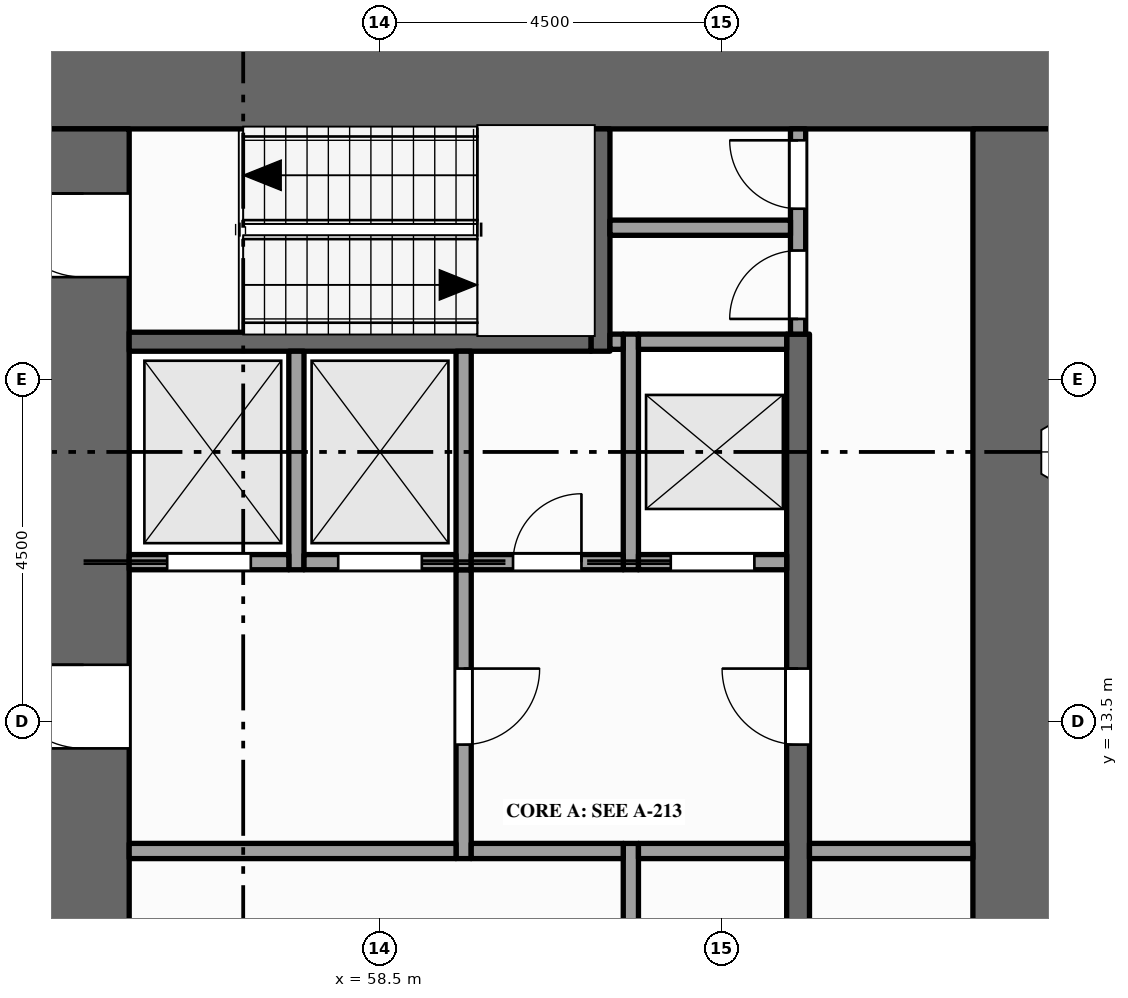
"""IFC4 building model, lengths in metres.
Left out: names, types, materials, properties, quantities, classifications, styles, units other than length and angle.
Written with IfcOpenShell. Run it as: python <this file> out.ifc"""

import sys

from ifc_helpers import new_model, si_unit, direction, frame, frame_2d, origin, place, context, subcontext, project, spatial, rectangle, extrude, element, fill, save


model = new_model("IFC4")
c1 = context("Model", 3, precision=1e-05, world=origin(), true_north=direction((0.0, 1.0)))
c2 = subcontext(c1, "Body", "Model", "MODEL_VIEW")
j1 = project(units=[si_unit("LENGTHUNIT", "METRE"), si_unit("PLANEANGLEUNIT", "RADIAN")], contexts=[c1])
p1 = place(None, origin())
s1 = spatial("IfcSite", under=j1, at=p1, CompositionType="ELEMENT")
p2 = place(p1, origin())
s2 = spatial("IfcBuilding", under=s1, at=p2, CompositionType="ELEMENT")
p3 = place(p2, frame((0.0, 0.0, 69.0)))
s3 = spatial("IfcBuildingStorey", under=s2, at=p3, CompositionType="ELEMENT", Elevation=69.0)
p4 = place(p3, frame((54.0, 21.9, -0.15), z_axis=(0.0, 0.0, 1.0), x_axis=(1.0, 0.0, 0.0)))
e1 = element("IfcWall", 1, at=p4, inside=s3, PredefinedType="SHEAR", context=c2, shape_type="SweptSolid", body=[
    extrude(rectangle(XDim=13.5, YDim=1.2, at=frame_2d((6.75, 0.0))), origin(), (0.0, 0.0, 1.0), 4.0),
])
p5 = place(p3, frame((54.6, 1.2, -0.15), z_axis=(0.0, 0.0, 1.0), x_axis=(0.0, 1.0, 0.0)))
e2 = element("IfcWall", 2, at=p5, inside=s3, PredefinedType="SHEAR", context=c2, shape_type="SweptSolid", body=[
    extrude(rectangle(XDim=20.1, YDim=1.2, at=frame_2d((10.05, 0.0))), origin(), (0.0, 0.0, 1.0), 4.0),
])
p6 = place(p5, frame((5.9, 0.0, 0.15)))
e3 = element("IfcOpeningElement", 3, at=p6, cuts=e2, PredefinedType="OPENING", context=c2, shape_type="SweptSolid", body=[
    extrude(rectangle(XDim=1.8, YDim=2.1, at=frame_2d((0.9, 1.05))), frame((0.0, 0.61, 0.0), z_axis=(0.0, -1.0, 0.0), x_axis=(1.0, 0.0, 0.0)), (0.0, 0.0, 1.0), 1.22),
])
p7 = place(p5, frame((11.95, 0.0, 0.15)))
e4 = element("IfcOpeningElement", 4, at=p7, cuts=e2, PredefinedType="OPENING", context=c2, shape_type="SweptSolid", body=[
    extrude(rectangle(XDim=1.1, YDim=2.1, at=frame_2d((0.55, 1.05))), frame((0.0, 0.61, 0.0), z_axis=(0.0, -1.0, 0.0), x_axis=(1.0, 0.0, 0.0)), (0.0, 0.0, 1.0), 1.22),
])
p8 = place(p5, frame((0.95, 0.0, 0.15)))
e5 = element("IfcOpeningElement", 5, at=p8, cuts=e2, PredefinedType="OPENING", context=c2, shape_type="SweptSolid", body=[
    extrude(rectangle(XDim=1.1, YDim=2.1, at=frame_2d((0.55, 1.05))), frame((0.0, 0.61, 0.0), z_axis=(0.0, -1.0, 0.0), x_axis=(1.0, 0.0, 0.0)), (0.0, 0.0, 1.0), 1.22),
])
p9 = place(p5, frame((18.15, 0.0, 0.15)))
e6 = element("IfcOpeningElement", 6, at=p9, cuts=e2, PredefinedType="OPENING", context=c2, shape_type="SweptSolid", body=[
    extrude(rectangle(XDim=1.1, YDim=2.1, at=frame_2d((0.55, 1.05))), frame((0.0, 0.61, 0.0), z_axis=(0.0, -1.0, 0.0), x_axis=(1.0, 0.0, 0.0)), (0.0, 0.0, 1.0), 1.22),
])
p10 = place(p3, frame((66.9, 1.2, -0.15), z_axis=(0.0, 0.0, 1.0), x_axis=(0.0, 1.0, 0.0)))
e7 = element("IfcWall", 7, at=p10, inside=s3, PredefinedType="SHEAR", context=c2, shape_type="SweptSolid", body=[
    extrude(rectangle(XDim=20.1, YDim=1.2, at=frame_2d((10.05, 0.0))), origin(), (0.0, 0.0, 1.0), 4.0),
])
p11 = place(p3, frame((57.4, 15.5, 0.0), z_axis=(0.0, 0.0, 1.0), x_axis=(0.0, 1.0, 0.0)))
e8 = element("IfcWall", 8, at=p11, inside=s3, PredefinedType="SOLIDWALL", context=c2, shape_type="SweptSolid", body=[
    extrude(rectangle(XDim=2.875, YDim=0.2, at=frame_2d((1.438, 0.0))), origin(), (0.0, 0.0, 1.0), 3.85),
])
p12 = place(p3, frame((59.6, 11.7, 0.0), z_axis=(0.0, 0.0, 1.0), x_axis=(0.0, 1.0, 0.0)))
e9 = element("IfcWall", 9, at=p12, inside=s3, PredefinedType="PARTITIONING", context=c2, shape_type="SweptSolid", body=[
    extrude(rectangle(XDim=3.8, YDim=0.2, at=frame_2d((1.9, 0.0))), origin(), (0.0, 0.0, 1.0), 3.85),
])
p13 = place(p12, frame((1.5, 0.0, 0.0)))
e10 = element("IfcOpeningElement", 10, at=p13, cuts=e9, PredefinedType="OPENING", context=c2, shape_type="SweptSolid", body=[
    extrude(rectangle(XDim=1.0, YDim=2.1, at=frame_2d((0.5, 1.05))), frame((0.0, 0.11, 0.0), z_axis=(0.0, -1.0, 0.0), x_axis=(1.0, 0.0, 0.0)), (0.0, 0.0, 1.0), 0.22),
])
p14 = place(p3, frame((59.6, 15.5, 0.0), z_axis=(0.0, 0.0, 1.0), x_axis=(0.0, 1.0, 0.0)))
e11 = element("IfcWall", 11, at=p14, inside=s3, PredefinedType="SOLIDWALL", context=c2, shape_type="SweptSolid", body=[
    extrude(rectangle(XDim=2.875, YDim=0.2, at=frame_2d((1.438, 0.0))), origin(), (0.0, 0.0, 1.0), 3.85),
])
p15 = place(p3, frame((61.4, 18.375, 0.0), z_axis=(0.0, 0.0, 1.0), x_axis=(0.0, 1.0, 0.0)))
e12 = element("IfcWall", 12, at=p15, inside=s3, PredefinedType="SHEAR", context=c2, shape_type="SweptSolid", body=[
    extrude(rectangle(XDim=2.925, YDim=0.25, at=frame_2d((1.462, 0.0))), origin(), (0.0, 0.0, 1.0), 3.85),
])
p16 = place(p3, frame((61.8, 9.3, 0.0), z_axis=(0.0, 0.0, 1.0), x_axis=(0.0, 1.0, 0.0)))
e13 = element("IfcWall", 13, at=p16, inside=s3, PredefinedType="PARTITIONING", context=c2, shape_type="SweptSolid", body=[
    extrude(rectangle(XDim=2.6, YDim=0.2, at=frame_2d((1.3, 0.0))), origin(), (0.0, 0.0, 1.0), 3.85),
])
p17 = place(p3, frame((61.8, 15.5, 0.0), z_axis=(0.0, 0.0, 1.0), x_axis=(0.0, 1.0, 0.0)))
e14 = element("IfcWall", 14, at=p17, inside=s3, PredefinedType="SOLIDWALL", context=c2, shape_type="SweptSolid", body=[
    extrude(rectangle(XDim=3.1, YDim=0.2, at=frame_2d((1.55, 0.0))), origin(), (0.0, 0.0, 1.0), 3.85),
])
p18 = place(p3, frame((64.0, 4.1, 0.0), z_axis=(0.0, 0.0, 1.0), x_axis=(0.0, 1.0, 0.0)))
e15 = element("IfcWall", 15, at=p18, inside=s3, PredefinedType="SHEAR", context=c2, shape_type="SweptSolid", body=[
    extrude(rectangle(XDim=14.5, YDim=0.3, at=frame_2d((7.25, 0.0))), origin(), (0.0, 0.0, 1.0), 3.85),
])
p19 = place(p18, frame((3.4, 0.0, 0.0)))
e16 = element("IfcOpeningElement", 16, at=p19, cuts=e15, PredefinedType="OPENING", context=c2, shape_type="SweptSolid", body=[
    extrude(rectangle(XDim=1.0, YDim=2.1, at=frame_2d((0.5, 1.05))), frame((0.0, 0.16, 0.0), z_axis=(0.0, -1.0, 0.0), x_axis=(1.0, 0.0, 0.0)), (0.0, 0.0, 1.0), 0.32),
])
p20 = place(p18, frame((9.1, 0.0, 0.0)))
e17 = element("IfcOpeningElement", 17, at=p20, cuts=e15, PredefinedType="OPENING", context=c2, shape_type="SweptSolid", body=[
    extrude(rectangle(XDim=1.0, YDim=2.1, at=frame_2d((0.5, 1.05))), frame((0.0, 0.16, 0.0), z_axis=(0.0, -1.0, 0.0), x_axis=(1.0, 0.0, 0.0)), (0.0, 0.0, 1.0), 0.32),
])
p21 = place(p3, frame((64.0, 18.6, 0.0), z_axis=(0.0, 0.0, 1.0), x_axis=(0.0, 1.0, 0.0)))
e18 = element("IfcWall", 18, at=p21, inside=s3, PredefinedType="PARTITIONING", context=c2, shape_type="SweptSolid", body=[
    extrude(rectangle(XDim=2.7, YDim=0.2, at=frame_2d((1.35, 0.0))), origin(), (0.0, 0.0, 1.0), 3.85),
])
p22 = place(p21, frame((0.2, 0.0, 0.0)))
e19 = element("IfcOpeningElement", 19, at=p22, cuts=e18, PredefinedType="OPENING", context=c2, shape_type="SweptSolid", body=[
    extrude(rectangle(XDim=0.9, YDim=2.1, at=frame_2d((0.45, 1.05))), frame((0.0, 0.11, 0.0), z_axis=(0.0, -1.0, 0.0), x_axis=(1.0, 0.0, 0.0)), (0.0, 0.0, 1.0), 0.22),
])
p23 = place(p21, frame((1.65, 0.0, 0.0)))
e20 = element("IfcOpeningElement", 20, at=p23, cuts=e18, PredefinedType="OPENING", context=c2, shape_type="SweptSolid", body=[
    extrude(rectangle(XDim=0.9, YDim=2.1, at=frame_2d((0.45, 1.05))), frame((0.0, 0.11, 0.0), z_axis=(0.0, -1.0, 0.0), x_axis=(1.0, 0.0, 0.0)), (0.0, 0.0, 1.0), 0.22),
])
p24 = place(p3, frame((55.2, 11.8, 0.0), z_axis=(0.0, 0.0, 1.0), x_axis=(1.0, 0.0, 0.0)))
e21 = element("IfcWall", 21, at=p24, inside=s3, PredefinedType="PARTITIONING", context=c2, shape_type="SweptSolid", body=[
    extrude(rectangle(XDim=4.3, YDim=0.2, at=frame_2d((2.15, 0.0))), origin(), (0.0, 0.0, 1.0), 3.85),
])
p25 = place(p3, frame((59.7, 11.8, 0.0), z_axis=(0.0, 0.0, 1.0), x_axis=(1.0, 0.0, 0.0)))
e22 = element("IfcWall", 22, at=p25, inside=s3, PredefinedType="PARTITIONING", context=c2, shape_type="SweptSolid", body=[
    extrude(rectangle(XDim=2.0, YDim=0.2, at=frame_2d((1.0, 0.0))), origin(), (0.0, 0.0, 1.0), 3.85),
])
p26 = place(p3, frame((61.9, 11.8, 0.0), z_axis=(0.0, 0.0, 1.0), x_axis=(1.0, 0.0, 0.0)))
e23 = element("IfcWall", 23, at=p26, inside=s3, PredefinedType="PARTITIONING", context=c2, shape_type="SweptSolid", body=[
    extrude(rectangle(XDim=1.95, YDim=0.2, at=frame_2d((0.975, 0.0))), origin(), (0.0, 0.0, 1.0), 3.85),
])
p27 = place(p3, frame((64.15, 11.8, 0.0), z_axis=(0.0, 0.0, 1.0), x_axis=(1.0, 0.0, 0.0)))
e24 = element("IfcWall", 24, at=p27, inside=s3, PredefinedType="PARTITIONING", context=c2, shape_type="SweptSolid", body=[
    extrude(rectangle(XDim=2.15, YDim=0.2, at=frame_2d((1.075, 0.0))), origin(), (0.0, 0.0, 1.0), 3.85),
])
p28 = place(p3, frame((55.2, 15.6, 0.0), z_axis=(0.0, 0.0, 1.0), x_axis=(1.0, 0.0, 0.0)))
e25 = element("IfcWall", 25, at=p28, inside=s3, PredefinedType="SOLIDWALL", context=c2, shape_type="SweptSolid", body=[
    extrude(rectangle(XDim=2.1, YDim=0.2, at=frame_2d((1.05, 0.0))), origin(), (0.0, 0.0, 1.0), 3.85),
])
p29 = place(p28, frame((0.5, 0.0, 0.012)))
e26 = element("IfcOpeningElement", 26, at=p29, cuts=e25, PredefinedType="OPENING", context=c2, shape_type="SweptSolid", body=[
    extrude(rectangle(XDim=1.1, YDim=2.1, at=frame_2d((0.55, 1.05))), frame((0.0, 0.11, 0.0), z_axis=(0.0, -1.0, 0.0), x_axis=(1.0, 0.0, 0.0)), (0.0, 0.0, 1.0), 0.22),
])
p30 = place(p3, frame((57.5, 15.6, 0.0), z_axis=(0.0, 0.0, 1.0), x_axis=(1.0, 0.0, 0.0)))
e27 = element("IfcWall", 27, at=p30, inside=s3, PredefinedType="SOLIDWALL", context=c2, shape_type="SweptSolid", body=[
    extrude(rectangle(XDim=2.0, YDim=0.2, at=frame_2d((1.0, 0.0))), origin(), (0.0, 0.0, 1.0), 3.85),
])
p31 = place(p30, frame((0.45, 0.0, 0.012)))
e28 = element("IfcOpeningElement", 28, at=p31, cuts=e27, PredefinedType="OPENING", context=c2, shape_type="SweptSolid", body=[
    extrude(rectangle(XDim=1.1, YDim=2.1, at=frame_2d((0.55, 1.05))), frame((0.0, 0.11, 0.0), z_axis=(0.0, -1.0, 0.0), x_axis=(1.0, 0.0, 0.0)), (0.0, 0.0, 1.0), 0.22),
])
p32 = place(p3, frame((59.7, 15.6, 0.0), z_axis=(0.0, 0.0, 1.0), x_axis=(1.0, 0.0, 0.0)))
e29 = element("IfcWall", 29, at=p32, inside=s3, PredefinedType="PARTITIONING", context=c2, shape_type="SweptSolid", body=[
    extrude(rectangle(XDim=2.0, YDim=0.2, at=frame_2d((1.0, 0.0))), origin(), (0.0, 0.0, 1.0), 3.85),
])
p33 = place(p32, frame((0.55, 0.0, 0.0)))
e30 = element("IfcOpeningElement", 30, at=p33, cuts=e29, PredefinedType="OPENING", context=c2, shape_type="SweptSolid", body=[
    extrude(rectangle(XDim=0.9, YDim=2.1, at=frame_2d((0.45, 1.05))), frame((0.0, 0.11, 0.0), z_axis=(0.0, -1.0, 0.0), x_axis=(1.0, 0.0, 0.0)), (0.0, 0.0, 1.0), 0.22),
])
p34 = place(p3, frame((61.9, 15.6, 0.0), z_axis=(0.0, 0.0, 1.0), x_axis=(1.0, 0.0, 0.0)))
e31 = element("IfcWall", 31, at=p34, inside=s3, PredefinedType="SOLIDWALL", context=c2, shape_type="SweptSolid", body=[
    extrude(rectangle(XDim=1.95, YDim=0.2, at=frame_2d((0.975, 0.0))), origin(), (0.0, 0.0, 1.0), 3.85),
])
p35 = place(p34, frame((0.425, 0.0, 0.012)))
e32 = element("IfcOpeningElement", 32, at=p35, cuts=e31, PredefinedType="OPENING", context=c2, shape_type="SweptSolid", body=[
    extrude(rectangle(XDim=1.1, YDim=2.1, at=frame_2d((0.55, 1.05))), frame((0.0, 0.11, 0.0), z_axis=(0.0, -1.0, 0.0), x_axis=(1.0, 0.0, 0.0)), (0.0, 0.0, 1.0), 0.22),
])
p36 = place(p3, frame((55.2, 18.5, 0.0), z_axis=(0.0, 0.0, 1.0), x_axis=(1.0, 0.0, 0.0)))
e33 = element("IfcWall", 33, at=p36, inside=s3, PredefinedType="SHEAR", context=c2, shape_type="SweptSolid", body=[
    extrude(rectangle(XDim=6.075, YDim=0.25, at=frame_2d((3.038, 0.0))), origin(), (0.0, 0.0, 1.0), 3.85),
])
p37 = place(p3, frame((61.525, 18.5, 0.0), z_axis=(0.0, 0.0, 1.0), x_axis=(1.0, 0.0, 0.0)))
e34 = element("IfcWall", 34, at=p37, inside=s3, PredefinedType="PARTITIONING", context=c2, shape_type="SweptSolid", body=[
    extrude(rectangle(XDim=0.175, YDim=0.2, at=frame_2d((0.087, 0.0))), origin(), (0.0, 0.0, 1.0), 3.85),
])
p38 = place(p3, frame((61.9, 18.5, 0.0), z_axis=(0.0, 0.0, 1.0), x_axis=(1.0, 0.0, 0.0)))
e35 = element("IfcWall", 35, at=p38, inside=s3, PredefinedType="SOLIDWALL", context=c2, shape_type="SweptSolid", body=[
    extrude(rectangle(XDim=1.95, YDim=0.2, at=frame_2d((0.975, 0.0))), origin(), (0.0, 0.0, 1.0), 3.85),
])
p39 = place(p3, frame((61.525, 20.0, 0.0), z_axis=(0.0, 0.0, 1.0), x_axis=(1.0, 0.0, 0.0)))
e36 = element("IfcWall", 36, at=p39, inside=s3, PredefinedType="PARTITIONING", context=c2, shape_type="SweptSolid", body=[
    extrude(rectangle(XDim=2.375, YDim=0.2, at=frame_2d((1.188, 0.0))), origin(), (0.0, 0.0, 1.0), 3.85),
])
p40 = place(p29, origin())
e37 = element("IfcDoor", 37, at=p40, inside=s3, OperationType="SLIDING_TO_LEFT", PredefinedType="DOOR", context=c2, shape_type="SweptSolid", body=[
    extrude(rectangle(XDim=1.1, YDim=2.1, at=frame_2d((0.55, 1.05))), frame((0.0, 0.025, 0.0), z_axis=(0.0, -1.0, 0.0), x_axis=(1.0, 0.0, 0.0)), (0.0, 0.0, 1.0), 0.05),
])
fill(e26, e37)
p41 = place(p31, origin())
e38 = element("IfcDoor", 38, at=p41, inside=s3, OperationType="SLIDING_TO_RIGHT", PredefinedType="DOOR", context=c2, shape_type="SweptSolid", body=[
    extrude(rectangle(XDim=1.1, YDim=2.1, at=frame_2d((0.55, 1.05))), frame((0.0, 0.025, 0.0), z_axis=(0.0, -1.0, 0.0), x_axis=(1.0, 0.0, 0.0)), (0.0, 0.0, 1.0), 0.05),
])
fill(e28, e38)
p42 = place(p35, origin())
e39 = element("IfcDoor", 39, at=p42, inside=s3, OperationType="SLIDING_TO_LEFT", PredefinedType="DOOR", context=c2, shape_type="SweptSolid", body=[
    extrude(rectangle(XDim=1.1, YDim=2.1, at=frame_2d((0.55, 1.05))), frame((0.0, 0.025, 0.0), z_axis=(0.0, -1.0, 0.0), x_axis=(1.0, 0.0, 0.0)), (0.0, 0.0, 1.0), 0.05),
])
fill(e32, e39)
p43 = place(p7, origin())
e40 = element("IfcDoor", 40, at=p43, inside=s3, OperationType="SINGLE_SWING_RIGHT", PredefinedType="DOOR", context=c2, shape_type="SweptSolid", body=[
    extrude(rectangle(XDim=1.1, YDim=2.1, at=frame_2d((0.55, 1.05))), frame((0.0, 0.025, 0.0), z_axis=(0.0, -1.0, 0.0), x_axis=(1.0, 0.0, 0.0)), (0.0, 0.0, 1.0), 0.05),
])
fill(e4, e40)
p44 = place(p13, origin())
e41 = element("IfcDoor", 41, at=p44, inside=s3, OperationType="SINGLE_SWING_RIGHT", PredefinedType="DOOR", context=c2, shape_type="SweptSolid", body=[
    extrude(rectangle(XDim=1.0, YDim=2.1, at=frame_2d((0.5, 1.05))), frame((0.0, 0.025, 0.0), z_axis=(0.0, -1.0, 0.0), x_axis=(1.0, 0.0, 0.0)), (0.0, 0.0, 1.0), 0.05),
])
fill(e10, e41)
p45 = place(p20, origin())
e42 = element("IfcDoor", 42, at=p45, inside=s3, OperationType="SINGLE_SWING_RIGHT", PredefinedType="DOOR", context=c2, shape_type="SweptSolid", body=[
    extrude(rectangle(XDim=1.0, YDim=2.1, at=frame_2d((0.5, 1.05))), frame((0.0, 0.025, 0.0), z_axis=(0.0, -1.0, 0.0), x_axis=(1.0, 0.0, 0.0)), (0.0, 0.0, 1.0), 0.05),
])
fill(e17, e42)
p46 = place(p9, origin())
e43 = element("IfcDoor", 43, at=p46, inside=s3, OperationType="SINGLE_SWING_RIGHT", PredefinedType="DOOR", context=c2, shape_type="SweptSolid", body=[
    extrude(rectangle(XDim=1.1, YDim=2.1, at=frame_2d((0.55, 1.05))), frame((0.0, 0.025, 0.0), z_axis=(0.0, -1.0, 0.0), x_axis=(1.0, 0.0, 0.0)), (0.0, 0.0, 1.0), 0.05),
])
fill(e6, e43)
p47 = place(p22, origin())
e44 = element("IfcDoor", 44, at=p47, inside=s3, OperationType="SINGLE_SWING_LEFT", PredefinedType="DOOR", context=c2, shape_type="SweptSolid", body=[
    extrude(rectangle(XDim=0.9, YDim=2.1, at=frame_2d((0.45, 1.05))), frame((0.0, 0.025, 0.0), z_axis=(0.0, -1.0, 0.0), x_axis=(1.0, 0.0, 0.0)), (0.0, 0.0, 1.0), 0.05),
])
fill(e19, e44)
p48 = place(p23, origin())
e45 = element("IfcDoor", 45, at=p48, inside=s3, OperationType="SINGLE_SWING_RIGHT", PredefinedType="DOOR", context=c2, shape_type="SweptSolid", body=[
    extrude(rectangle(XDim=0.9, YDim=2.1, at=frame_2d((0.45, 1.05))), frame((0.0, 0.025, 0.0), z_axis=(0.0, -1.0, 0.0), x_axis=(1.0, 0.0, 0.0)), (0.0, 0.0, 1.0), 0.05),
])
fill(e20, e45)
p49 = place(p33, origin())
e46 = element("IfcDoor", 46, at=p49, inside=s3, OperationType="SINGLE_SWING_RIGHT", PredefinedType="DOOR", context=c2, shape_type="SweptSolid", body=[
    extrude(rectangle(XDim=0.9, YDim=2.1, at=frame_2d((0.45, 1.05))), frame((0.0, 0.025, 0.0), z_axis=(0.0, -1.0, 0.0), x_axis=(1.0, 0.0, 0.0)), (0.0, 0.0, 1.0), 0.05),
])
fill(e30, e46)
save(model, sys.argv[1])
